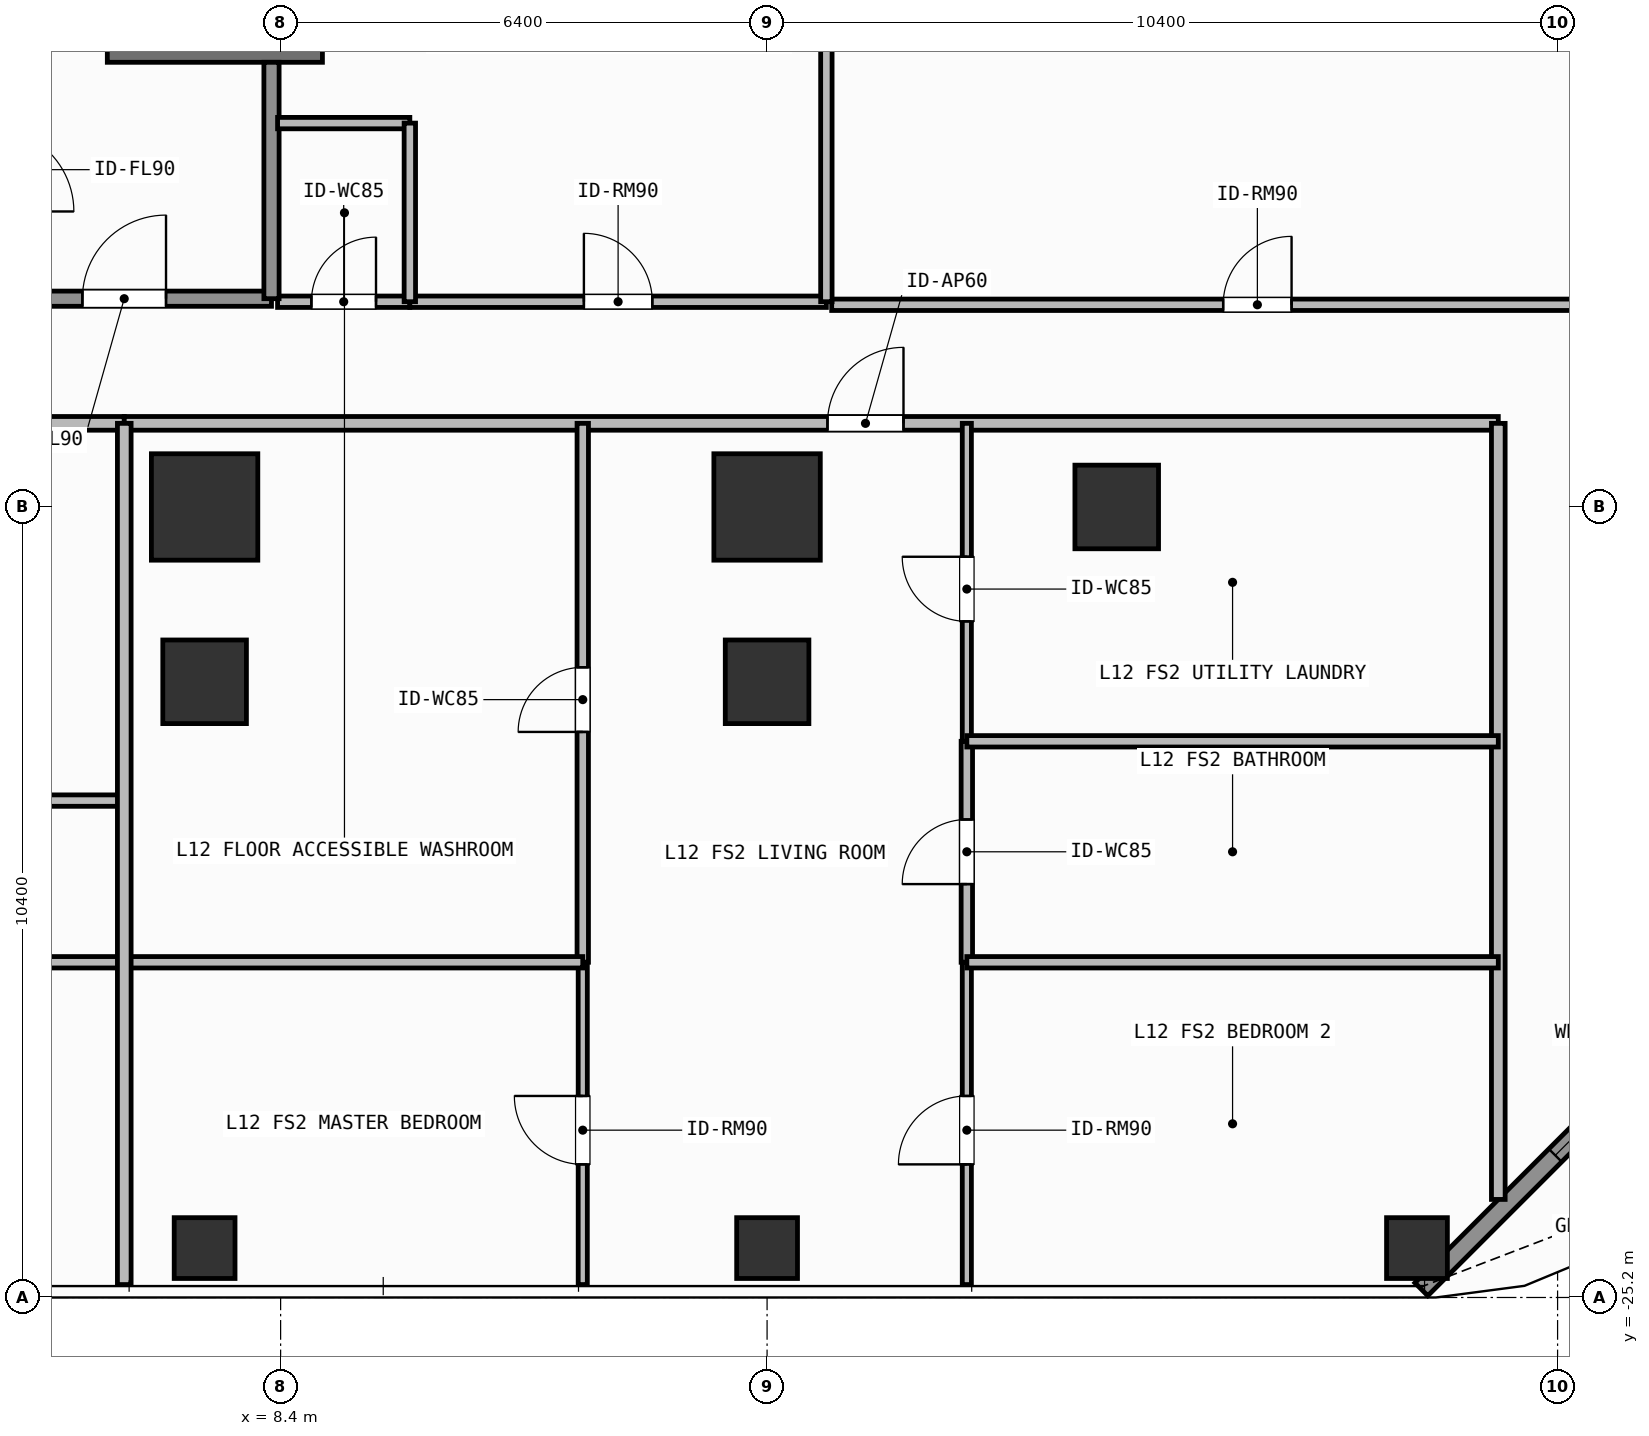
"""IFC4 building model, lengths in metres.
Left out: names, types, materials, properties, quantities, classifications, styles, units other than length and angle.
Written with IfcOpenShell. Run it as: python <this file> out.ifc"""

import sys

from ifc_helpers import new_model, si_unit, direction, frame, frame_2d, origin, origin_2d, place, context, subcontext, project, spatial, rectangle, hollow_rectangle, extrude, element, fill, save


model = new_model("IFC4")
c1 = context("Model", 3, precision=1e-05, world=origin(), true_north=direction((0.0, 1.0)))
c2 = subcontext(c1, "Body", "Model", "MODEL_VIEW")
j1 = project(units=[si_unit("LENGTHUNIT", "METRE"), si_unit("PLANEANGLEUNIT", "RADIAN")], contexts=[c1])
p1 = place(None, origin())
s1 = spatial("IfcSite", under=j1, at=p1, CompositionType="ELEMENT")
p2 = place(p1, origin())
s2 = spatial("IfcBuilding", under=s1, at=p2, CompositionType="ELEMENT")
p3 = place(p2, frame((0.0, 0.0, 46.2)))
s3 = spatial("IfcBuildingStorey", under=s2, at=p3, CompositionType="ELEMENT", Elevation=46.2)
p4 = place(p3, frame((6.12, -8.4, 0.0), z_axis=(0.0, 0.0, 1.0), x_axis=(1.0, 0.0, 0.0)))
e1 = element("IfcWall", 1, at=p4, inside=s3, PredefinedType="SHEAR", context=c2, shape_type="SweptSolid", body=[
    extrude(rectangle(XDim=2.83, YDim=1.1, at=frame_2d((1.415, 0.0))), origin(), (0.0, 0.0, 1.0), 3.9),
])
for number, where, z_axis, x_axis in (
    (2, (7.4, -14.8, 0.0), (0.0, 0.0, 1.0), (1.0, 0.0, 0.0)),
    (3, (14.8, -14.8, 0.0), (0.0, 0.0, 1.0), (1.0, 0.0, 0.0)),
):
    element("IfcColumn", number, at=place(p3, frame(where, z_axis=z_axis, x_axis=x_axis)), inside=s3, PredefinedType="COLUMN", context=c2, shape_type="SweptSolid", body=[
        extrude(rectangle(XDim=1.4, YDim=1.4, at=origin_2d()), origin(), (0.0, 0.0, 1.0), 3.9),
    ])
for number, where, z_axis, x_axis in (
    (4, (19.4, -14.8, 0.0), (0.0, 0.0, 1.0), (1.0, 0.0, 0.0)),
    (5, (7.4, -17.1, 0.0), (0.0, 0.0, 1.0), (1.0, 0.0, 0.0)),
    (6, (14.8, -17.1, 0.0), (0.0, 0.0, 1.0), (1.0, 0.0, 0.0)),
):
    element("IfcColumn", number, at=place(p3, frame(where, z_axis=z_axis, x_axis=x_axis)), inside=s3, PredefinedType="COLUMN", context=c2, shape_type="SweptSolid", body=[
        extrude(rectangle(XDim=1.1, YDim=1.1, at=origin_2d()), origin(), (0.0, 0.0, 1.0), 3.9),
    ])
for number, where, z_axis, x_axis in (
    (7, (23.35, -24.55, 0.0), (0.0, 0.0, 1.0), (1.0, 0.0, 0.0)),
    (8, (7.4, -24.55, 0.0), (0.0, 0.0, 1.0), (1.0, 0.0, 0.0)),
    (9, (14.8, -24.55, 0.0), (0.0, 0.0, 1.0), (1.0, 0.0, 0.0)),
):
    element("IfcColumn", number, at=place(p3, frame(where, z_axis=z_axis, x_axis=x_axis)), inside=s3, PredefinedType="COLUMN", context=c2, shape_type="SweptSolid", body=[
        extrude(hollow_rectangle(XDim=0.8, YDim=0.8, WallThickness=0.036, at=origin_2d()), origin(), (0.0, 0.0, 1.0), 3.9),
    ])
p5 = place(p3, frame((27.992, -20.508, 0.0), z_axis=(0.0, 0.0, 1.0), x_axis=(-0.707106781187, -0.707106781187, 0.0)))
e10 = element("IfcWall", 10, at=p5, inside=s3, PredefinedType="SOLIDWALL", context=c2, shape_type="SweptSolid", body=[
    extrude(rectangle(XDim=6.484, YDim=0.24, at=frame_2d((3.242, 0.0))), origin(), (0.0, 0.0, 1.0), 3.68),
])
p6 = place(p5, frame((2.492, 0.0, 0.8)))
e11 = element("IfcOpeningElement", 11, at=p6, cuts=e10, PredefinedType="OPENING", context=c2, shape_type="SweptSolid", body=[
    extrude(rectangle(XDim=1.5, YDim=1.85, at=frame_2d((0.75, 0.925))), frame((0.0, 0.13, 0.0), z_axis=(0.0, -1.0, 0.0), x_axis=(1.0, 0.0, 0.0)), (0.0, 0.0, 1.0), 0.26),
])
p7 = place(p3, frame((4.58, -12.06, 0.0), z_axis=(0.0, 0.0, 1.0), x_axis=(1.0, 0.0, 0.0)))
e12 = element("IfcWall", 12, at=p7, inside=s3, PredefinedType="SOLIDWALL", context=c2, shape_type="SweptSolid", body=[
    extrude(rectangle(XDim=3.7, YDim=0.2, at=frame_2d((1.85, 0.0))), origin(), (0.0, 0.0, 1.0), 3.68),
])
p8 = place(p7, frame((1.212, 0.0, 0.0)))
e13 = element("IfcOpeningElement", 13, at=p8, cuts=e12, PredefinedType="OPENING", context=c2, shape_type="SweptSolid", body=[
    extrude(rectangle(XDim=1.1, YDim=2.15, at=frame_2d((0.55, 1.075))), frame((0.0, 0.11, 0.0), z_axis=(0.0, -1.0, 0.0), x_axis=(1.0, 0.0, 0.0)), (0.0, 0.0, 1.0), 0.22),
])
p9 = place(p3, frame((8.36, -12.1, 0.0), z_axis=(0.0, 0.0, 1.0), x_axis=(1.0, 0.0, 0.0)))
e14 = element("IfcWall", 14, at=p9, inside=s3, PredefinedType="PARTITIONING", context=c2, shape_type="SweptSolid", body=[
    extrude(rectangle(XDim=1.74, YDim=0.15, at=frame_2d((0.87, 0.0))), origin(), (0.0, 0.0, 1.0), 3.68),
])
p10 = place(p9, frame((0.445, 0.0, 0.0)))
e15 = element("IfcOpeningElement", 15, at=p10, cuts=e14, PredefinedType="OPENING", context=c2, shape_type="SweptSolid", body=[
    extrude(rectangle(XDim=0.85, YDim=2.1, at=frame_2d((0.425, 1.05))), frame((0.0, 0.085, 0.0), z_axis=(0.0, -1.0, 0.0), x_axis=(1.0, 0.0, 0.0)), (0.0, 0.0, 1.0), 0.17),
])
p11 = place(p3, frame((10.1, -12.1, 0.0), z_axis=(0.0, 0.0, 1.0), x_axis=(1.0, 0.0, 0.0)))
e16 = element("IfcWall", 16, at=p11, inside=s3, PredefinedType="PARTITIONING", context=c2, shape_type="SweptSolid", body=[
    extrude(rectangle(XDim=5.48, YDim=0.15, at=frame_2d((2.74, 0.0))), origin(), (0.0, 0.0, 1.0), 3.68),
])
p12 = place(p11, frame((2.29, 0.0, 0.0)))
e17 = element("IfcOpeningElement", 17, at=p12, cuts=e16, PredefinedType="OPENING", context=c2, shape_type="SweptSolid", body=[
    extrude(rectangle(XDim=0.9, YDim=2.1, at=frame_2d((0.45, 1.05))), frame((0.0, 0.085, 0.0), z_axis=(0.0, -1.0, 0.0), x_axis=(1.0, 0.0, 0.0)), (0.0, 0.0, 1.0), 0.17),
])
p13 = place(p3, frame((-18.62, -13.7, 0.0), z_axis=(0.0, 0.0, 1.0), x_axis=(1.0, 0.0, 0.0)))
e18 = element("IfcWall", 18, at=p13, inside=s3, PredefinedType="PARTITIONING", context=c2, shape_type="SweptSolid", body=[
    extrude(rectangle(XDim=24.963, YDim=0.18, at=frame_2d((12.481, 0.0))), origin(), (0.0, 0.0, 1.0), 3.68),
])
p14 = place(p13, frame((11.981, 0.0, 0.0)))
e19 = element("IfcOpeningElement", 19, at=p14, cuts=e18, PredefinedType="OPENING", context=c2, shape_type="SweptSolid", body=[
    extrude(rectangle(XDim=1.0, YDim=2.2, at=frame_2d((0.5, 1.1))), frame((0.0, 0.1, 0.0), z_axis=(0.0, -1.0, 0.0), x_axis=(1.0, 0.0, 0.0)), (0.0, 0.0, 1.0), 0.2),
])
p15 = place(p3, frame((6.343, -13.7, 0.0), z_axis=(0.0, 0.0, 1.0), x_axis=(1.0, 0.0, 0.0)))
e20 = element("IfcWall", 20, at=p15, inside=s3, PredefinedType="PARTITIONING", context=c2, shape_type="SweptSolid", body=[
    extrude(rectangle(XDim=18.077, YDim=0.18, at=frame_2d((9.039, 0.0))), origin(), (0.0, 0.0, 1.0), 3.68),
])
p16 = place(p15, frame((9.252, 0.0, 0.0)))
e21 = element("IfcOpeningElement", 21, at=p16, cuts=e20, PredefinedType="OPENING", context=c2, shape_type="SweptSolid", body=[
    extrude(rectangle(XDim=1.0, YDim=2.2, at=frame_2d((0.5, 1.1))), frame((0.0, 0.1, 0.0), z_axis=(0.0, -1.0, 0.0), x_axis=(1.0, 0.0, 0.0)), (0.0, 0.0, 1.0), 0.2),
])
p17 = place(p3, frame((12.375, -20.79, 0.0), z_axis=(0.0, 0.0, 1.0), x_axis=(0.0, 1.0, 0.0)))
e22 = element("IfcWall", 22, at=p17, inside=s3, PredefinedType="PARTITIONING", context=c2, shape_type="SweptSolid", body=[
    extrude(rectangle(XDim=7.09, YDim=0.15, at=frame_2d((3.545, 0.0))), origin(), (0.0, 0.0, 1.0), 3.68),
])
p18 = place(p17, frame((3.03, 0.0, 0.0)))
e23 = element("IfcOpeningElement", 23, at=p18, cuts=e22, PredefinedType="OPENING", context=c2, shape_type="SweptSolid", body=[
    extrude(rectangle(XDim=0.85, YDim=2.1, at=frame_2d((0.425, 1.05))), frame((0.0, 0.085, 0.0), z_axis=(0.0, -1.0, 0.0), x_axis=(1.0, 0.0, 0.0)), (0.0, 0.0, 1.0), 0.17),
])
p19 = place(p3, frame((12.375, -25.03, 0.0), z_axis=(0.0, 0.0, 1.0), x_axis=(0.0, 1.0, 0.0)))
e24 = element("IfcWall", 24, at=p19, inside=s3, PredefinedType="PARTITIONING", context=c2, shape_type="SweptSolid", body=[
    extrude(rectangle(XDim=4.24, YDim=0.12, at=frame_2d((2.12, 0.0))), origin(), (0.0, 0.0, 1.0), 3.68),
])
p20 = place(p19, frame((1.581, 0.0, 0.0)))
e25 = element("IfcOpeningElement", 25, at=p20, cuts=e24, PredefinedType="OPENING", context=c2, shape_type="SweptSolid", body=[
    extrude(rectangle(XDim=0.9, YDim=2.1, at=frame_2d((0.45, 1.05))), frame((0.0, 0.07, 0.0), z_axis=(0.0, -1.0, 0.0), x_axis=(1.0, 0.0, 0.0)), (0.0, 0.0, 1.0), 0.14),
])
p21 = place(p3, frame((17.428, -20.79, 0.0), z_axis=(0.0, 0.0, 1.0), x_axis=(0.0, 1.0, 0.0)))
e26 = element("IfcWall", 26, at=p21, inside=s3, PredefinedType="PARTITIONING", context=c2, shape_type="SweptSolid", body=[
    extrude(rectangle(XDim=2.907, YDim=0.15, at=frame_2d((1.454, 0.0))), origin(), (0.0, 0.0, 1.0), 3.68),
])
p22 = place(p21, frame((1.029, 0.0, 0.0)))
e27 = element("IfcOpeningElement", 27, at=p22, cuts=e26, PredefinedType="OPENING", context=c2, shape_type="SweptSolid", body=[
    extrude(rectangle(XDim=0.85, YDim=2.1, at=frame_2d((0.425, 1.05))), frame((0.0, 0.085, 0.0), z_axis=(0.0, -1.0, 0.0), x_axis=(1.0, 0.0, 0.0)), (0.0, 0.0, 1.0), 0.17),
])
p23 = place(p3, frame((17.428, -17.883, 0.0), z_axis=(0.0, 0.0, 1.0), x_axis=(0.0, 1.0, 0.0)))
e28 = element("IfcWall", 28, at=p23, inside=s3, PredefinedType="PARTITIONING", context=c2, shape_type="SweptSolid", body=[
    extrude(rectangle(XDim=4.183, YDim=0.12, at=frame_2d((2.092, 0.0))), origin(), (0.0, 0.0, 1.0), 3.68),
])
p24 = place(p23, frame((1.578, 0.0, 0.0)))
e29 = element("IfcOpeningElement", 29, at=p24, cuts=e28, PredefinedType="OPENING", context=c2, shape_type="SweptSolid", body=[
    extrude(rectangle(XDim=0.85, YDim=2.1, at=frame_2d((0.425, 1.05))), frame((0.0, 0.07, 0.0), z_axis=(0.0, -1.0, 0.0), x_axis=(1.0, 0.0, 0.0)), (0.0, 0.0, 1.0), 0.14),
])
p25 = place(p3, frame((17.428, -25.03, 0.0), z_axis=(0.0, 0.0, 1.0), x_axis=(0.0, 1.0, 0.0)))
e30 = element("IfcWall", 30, at=p25, inside=s3, PredefinedType="PARTITIONING", context=c2, shape_type="SweptSolid", body=[
    extrude(rectangle(XDim=4.24, YDim=0.12, at=frame_2d((2.12, 0.0))), origin(), (0.0, 0.0, 1.0), 3.68),
])
p26 = place(p25, frame((1.581, 0.0, 0.0)))
e31 = element("IfcOpeningElement", 31, at=p26, cuts=e30, PredefinedType="OPENING", context=c2, shape_type="SweptSolid", body=[
    extrude(rectangle(XDim=0.9, YDim=2.1, at=frame_2d((0.45, 1.05))), frame((0.0, 0.07, 0.0), z_axis=(0.0, -1.0, 0.0), x_axis=(1.0, 0.0, 0.0)), (0.0, 0.0, 1.0), 0.14),
])
p27 = place(p3, frame((15.65, -12.14, 0.0), z_axis=(0.0, 0.0, 1.0), x_axis=(1.0, 0.0, 0.0)))
e32 = element("IfcWall", 32, at=p27, inside=s3, PredefinedType="PARTITIONING", context=c2, shape_type="SweptSolid", body=[
    extrude(rectangle(XDim=12.27, YDim=0.15, at=frame_2d((6.135, 0.0))), origin(), (0.0, 0.0, 1.0), 3.68),
])
p28 = place(p27, frame((5.15, 0.0, 0.0)))
e33 = element("IfcOpeningElement", 33, at=p28, cuts=e32, PredefinedType="OPENING", context=c2, shape_type="SweptSolid", body=[
    extrude(rectangle(XDim=0.9, YDim=2.1, at=frame_2d((0.45, 1.05))), frame((0.0, 0.085, 0.0), z_axis=(0.0, -1.0, 0.0), x_axis=(1.0, 0.0, 0.0)), (0.0, 0.0, 1.0), 0.17),
])
p29 = place(p3, frame((8.28, -12.06, 0.0), z_axis=(0.0, 0.0, 1.0), x_axis=(0.0, 1.0, 0.0)))
e34 = element("IfcWall", 34, at=p29, inside=s3, PredefinedType="SOLIDWALL", context=c2, shape_type="SweptSolid", body=[
    extrude(rectangle(XDim=3.11, YDim=0.2, at=frame_2d((1.555, 0.0))), origin(), (0.0, 0.0, 1.0), 3.68),
])
p30 = place(p3, frame((8.36, -9.75, 0.0), z_axis=(0.0, 0.0, 1.0), x_axis=(1.0, 0.0, 0.0)))
e35 = element("IfcWall", 35, at=p30, inside=s3, PredefinedType="PARTITIONING", context=c2, shape_type="SweptSolid", body=[
    extrude(rectangle(XDim=1.74, YDim=0.15, at=frame_2d((0.87, 0.0))), origin(), (0.0, 0.0, 1.0), 3.68),
])
p31 = place(p3, frame((10.1, -12.1, 0.0), z_axis=(0.0, 0.0, 1.0), x_axis=(0.0, 1.0, 0.0)))
e36 = element("IfcWall", 36, at=p31, inside=s3, PredefinedType="PARTITIONING", context=c2, shape_type="SweptSolid", body=[
    extrude(rectangle(XDim=2.35, YDim=0.15, at=frame_2d((1.175, 0.0))), origin(), (0.0, 0.0, 1.0), 3.68),
])
p32 = place(p3, frame((15.58, -12.1, 0.0), z_axis=(0.0, 0.0, 1.0), x_axis=(0.0, 1.0, 0.0)))
e37 = element("IfcWall", 37, at=p32, inside=s3, PredefinedType="PARTITIONING", context=c2, shape_type="SweptSolid", body=[
    extrude(rectangle(XDim=6.25, YDim=0.15, at=frame_2d((3.125, 0.0))), origin(), (0.0, 0.0, 1.0), 3.68),
])
p33 = place(p3, frame((24.42, -23.91, 0.0), z_axis=(0.0, 0.0, 1.0), x_axis=(0.0, 1.0, 0.0)))
e38 = element("IfcWall", 38, at=p33, inside=s3, PredefinedType="PARTITIONING", context=c2, shape_type="SweptSolid", body=[
    extrude(rectangle(XDim=10.21, YDim=0.18, at=frame_2d((5.105, 0.0))), origin(), (0.0, 0.0, 1.0), 3.68),
])
for number, where, z_axis, x_axis in (
    (39, (1.987, -18.663, 0.0), (0.0, 0.0, 1.0), (1.0, 0.0, 0.0)),
    (40, (1.987, -20.79, 0.0), (0.0, 0.0, 1.0), (1.0, 0.0, 0.0)),
):
    element("IfcWall", number, at=place(p3, frame(where, z_axis=z_axis, x_axis=x_axis)), inside=s3, PredefinedType="PARTITIONING", context=c2, shape_type="SweptSolid", body=[
        extrude(rectangle(XDim=4.356, YDim=0.15, at=frame_2d((2.178, 0.0))), origin(), (0.0, 0.0, 1.0), 3.68),
    ])
p34 = place(p3, frame((6.343, -20.79, 0.0), z_axis=(0.0, 0.0, 1.0), x_axis=(1.0, 0.0, 0.0)))
e41 = element("IfcWall", 41, at=p34, inside=s3, PredefinedType="PARTITIONING", context=c2, shape_type="SweptSolid", body=[
    extrude(rectangle(XDim=6.032, YDim=0.15, at=frame_2d((3.016, 0.0))), origin(), (0.0, 0.0, 1.0), 3.68),
])
for number, where, z_axis, x_axis in (
    (42, (17.428, -17.883, 0.0), (0.0, 0.0, 1.0), (1.0, 0.0, 0.0)),
    (43, (17.428, -20.79, 0.0), (0.0, 0.0, 1.0), (1.0, 0.0, 0.0)),
):
    element("IfcWall", number, at=place(p3, frame(where, z_axis=z_axis, x_axis=x_axis)), inside=s3, PredefinedType="PARTITIONING", context=c2, shape_type="SweptSolid", body=[
        extrude(rectangle(XDim=6.992, YDim=0.15, at=frame_2d((3.496, 0.0))), origin(), (0.0, 0.0, 1.0), 3.68),
    ])
p35 = place(p3, frame((6.343, -25.03, 0.0), z_axis=(0.0, 0.0, 1.0), x_axis=(0.0, 1.0, 0.0)))
e44 = element("IfcWall", 44, at=p35, inside=s3, PredefinedType="PARTITIONING", context=c2, shape_type="SweptSolid", body=[
    extrude(rectangle(XDim=11.33, YDim=0.18, at=frame_2d((5.665, 0.0))), origin(), (0.0, 0.0, 1.0), 3.68),
])
p36 = place(p6, origin())
e45 = element("IfcWindow", 45, at=p36, inside=s3, PartitioningType="SINGLE_PANEL", PredefinedType="WINDOW", context=c2, shape_type="SweptSolid", body=[
    extrude(rectangle(XDim=1.5, YDim=1.85, at=frame_2d((0.75, 0.925))), frame((0.0, 0.03, 0.0), z_axis=(0.0, -1.0, 0.0), x_axis=(1.0, 0.0, 0.0)), (0.0, 0.0, 1.0), 0.06),
])
fill(e11, e45)
p37 = place(p8, origin())
e46 = element("IfcDoor", 46, at=p37, inside=s3, OperationType="SINGLE_SWING_RIGHT", PredefinedType="DOOR", context=c2, shape_type="SweptSolid", body=[
    extrude(rectangle(XDim=1.1, YDim=2.15, at=frame_2d((0.55, 1.075))), frame((0.0, 0.025, 0.0), z_axis=(0.0, -1.0, 0.0), x_axis=(1.0, 0.0, 0.0)), (0.0, 0.0, 1.0), 0.05),
])
fill(e13, e46)
p38 = place(p10, origin())
e47 = element("IfcDoor", 47, at=p38, inside=s3, OperationType="SINGLE_SWING_RIGHT", PredefinedType="DOOR", context=c2, shape_type="SweptSolid", body=[
    extrude(rectangle(XDim=0.85, YDim=2.1, at=frame_2d((0.425, 1.05))), frame((0.0, 0.025, 0.0), z_axis=(0.0, -1.0, 0.0), x_axis=(1.0, 0.0, 0.0)), (0.0, 0.0, 1.0), 0.05),
])
fill(e15, e47)
p39 = place(p12, origin())
e48 = element("IfcDoor", 48, at=p39, inside=s3, OperationType="SINGLE_SWING_LEFT", PredefinedType="DOOR", context=c2, shape_type="SweptSolid", body=[
    extrude(rectangle(XDim=0.9, YDim=2.1, at=frame_2d((0.45, 1.05))), frame((0.0, 0.025, 0.0), z_axis=(0.0, -1.0, 0.0), x_axis=(1.0, 0.0, 0.0)), (0.0, 0.0, 1.0), 0.05),
])
fill(e17, e48)
p40 = place(p16, origin())
e49 = element("IfcDoor", 49, at=p40, inside=s3, OperationType="SINGLE_SWING_RIGHT", PredefinedType="DOOR", context=c2, shape_type="SweptSolid", body=[
    extrude(rectangle(XDim=1.0, YDim=2.2, at=frame_2d((0.5, 1.1))), frame((0.0, 0.025, 0.0), z_axis=(0.0, -1.0, 0.0), x_axis=(1.0, 0.0, 0.0)), (0.0, 0.0, 1.0), 0.05),
])
fill(e21, e49)
p41 = place(p18, origin())
e50 = element("IfcDoor", 50, at=p41, inside=s3, OperationType="SINGLE_SWING_LEFT", PredefinedType="DOOR", context=c2, shape_type="SweptSolid", body=[
    extrude(rectangle(XDim=0.85, YDim=2.1, at=frame_2d((0.425, 1.05))), frame((0.0, 0.025, 0.0), z_axis=(0.0, -1.0, 0.0), x_axis=(1.0, 0.0, 0.0)), (0.0, 0.0, 1.0), 0.05),
])
fill(e23, e50)
p42 = place(p20, origin())
e51 = element("IfcDoor", 51, at=p42, inside=s3, OperationType="SINGLE_SWING_RIGHT", PredefinedType="DOOR", context=c2, shape_type="SweptSolid", body=[
    extrude(rectangle(XDim=0.9, YDim=2.1, at=frame_2d((0.45, 1.05))), frame((0.0, 0.025, 0.0), z_axis=(0.0, -1.0, 0.0), x_axis=(1.0, 0.0, 0.0)), (0.0, 0.0, 1.0), 0.05),
])
fill(e25, e51)
p43 = place(p22, origin())
e52 = element("IfcDoor", 52, at=p43, inside=s3, OperationType="SINGLE_SWING_LEFT", PredefinedType="DOOR", context=c2, shape_type="SweptSolid", body=[
    extrude(rectangle(XDim=0.85, YDim=2.1, at=frame_2d((0.425, 1.05))), frame((0.0, 0.025, 0.0), z_axis=(0.0, -1.0, 0.0), x_axis=(1.0, 0.0, 0.0)), (0.0, 0.0, 1.0), 0.05),
])
fill(e27, e52)
p44 = place(p24, origin())
e53 = element("IfcDoor", 53, at=p44, inside=s3, OperationType="SINGLE_SWING_RIGHT", PredefinedType="DOOR", context=c2, shape_type="SweptSolid", body=[
    extrude(rectangle(XDim=0.85, YDim=2.1, at=frame_2d((0.425, 1.05))), frame((0.0, 0.025, 0.0), z_axis=(0.0, -1.0, 0.0), x_axis=(1.0, 0.0, 0.0)), (0.0, 0.0, 1.0), 0.05),
])
fill(e29, e53)
p45 = place(p26, origin())
e54 = element("IfcDoor", 54, at=p45, inside=s3, OperationType="SINGLE_SWING_LEFT", PredefinedType="DOOR", context=c2, shape_type="SweptSolid", body=[
    extrude(rectangle(XDim=0.9, YDim=2.1, at=frame_2d((0.45, 1.05))), frame((0.0, 0.025, 0.0), z_axis=(0.0, -1.0, 0.0), x_axis=(1.0, 0.0, 0.0)), (0.0, 0.0, 1.0), 0.05),
])
fill(e31, e54)
p46 = place(p28, origin())
e55 = element("IfcDoor", 55, at=p46, inside=s3, OperationType="SINGLE_SWING_RIGHT", PredefinedType="DOOR", context=c2, shape_type="SweptSolid", body=[
    extrude(rectangle(XDim=0.9, YDim=2.1, at=frame_2d((0.45, 1.05))), frame((0.0, 0.025, 0.0), z_axis=(0.0, -1.0, 0.0), x_axis=(1.0, 0.0, 0.0)), (0.0, 0.0, 1.0), 0.05),
])
fill(e33, e55)
save(model, sys.argv[1])
